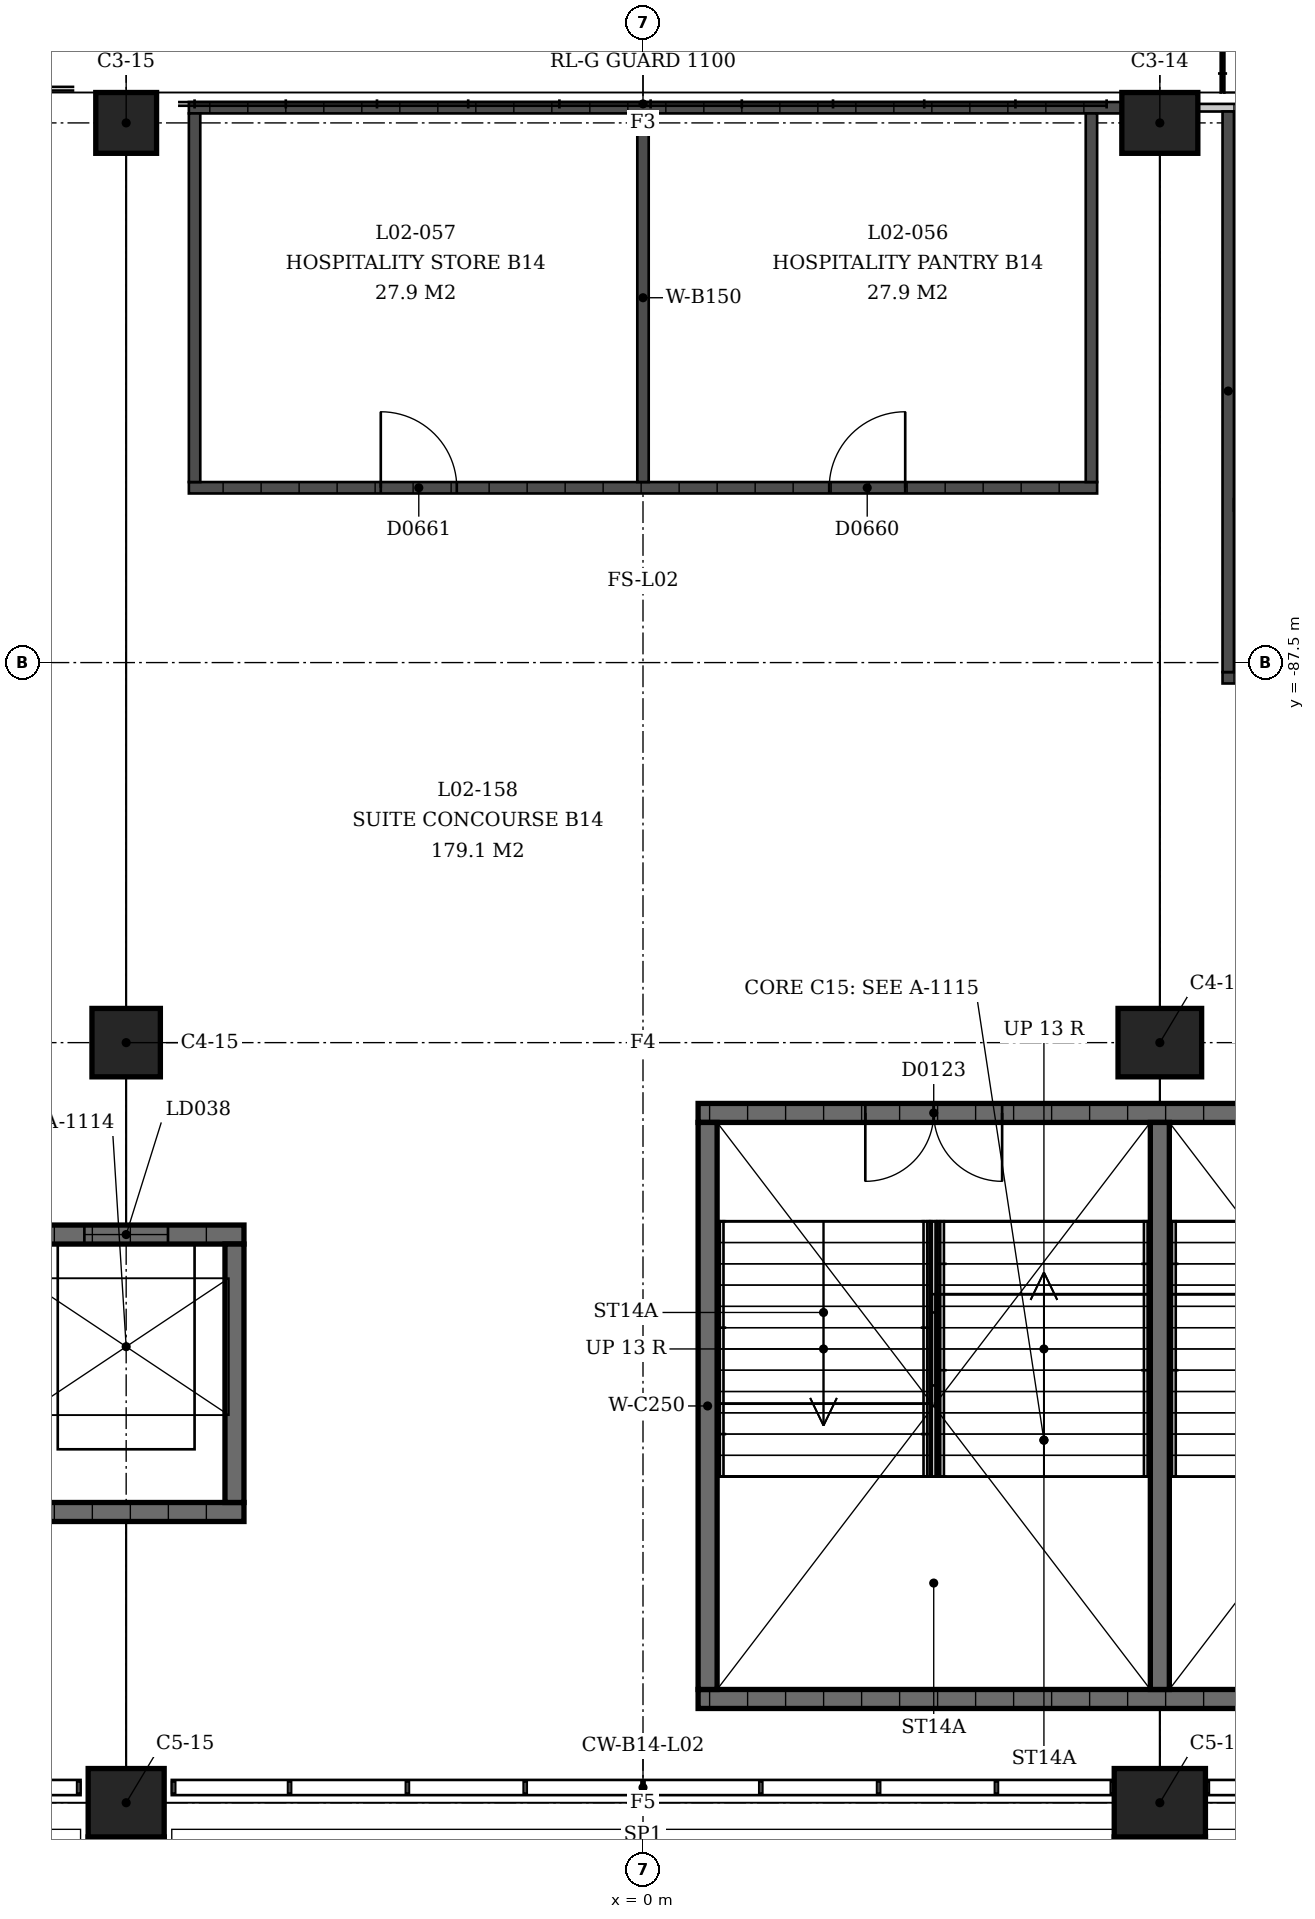
"""IFC4 building model, lengths in metres.
Left out: names, types, materials, properties, quantities, classifications, styles, units other than length and angle.
Written with IfcOpenShell. Run it as: python <this file> out.ifc"""

import sys

from ifc_helpers import new_model, si_unit, direction, frame, frame_2d, origin, origin_2d, place, context, subcontext, project, spatial, rectangle, extrude, element, fill, save


model = new_model("IFC4")
c1 = context("Model", 3, precision=1e-05, world=origin(), true_north=direction((0.0, 1.0)))
c2 = subcontext(c1, "Body", "Model", "MODEL_VIEW")
j1 = project(units=[si_unit("LENGTHUNIT", "METRE"), si_unit("PLANEANGLEUNIT", "RADIAN")], contexts=[c1])
p1 = place(None, origin())
s1 = spatial("IfcSite", under=j1, at=p1, CompositionType="ELEMENT")
p2 = place(p1, origin())
s2 = spatial("IfcBuilding", under=s1, at=p2, CompositionType="ELEMENT")
p3 = place(p2, frame((0.0, 0.0, 9.0)))
s3 = spatial("IfcBuildingStorey", under=s2, at=p3, CompositionType="ELEMENT", Elevation=9.0)
p4 = place(p3, frame((6.8, -80.4, 0.0), z_axis=(0.0, 0.0, 1.0), x_axis=(1.0, 0.0, 0.0)))
e1 = element("IfcColumn", 1, at=p4, inside=s3, PredefinedType="COLUMN", context=c2, shape_type="SweptSolid", body=[
    extrude(rectangle(XDim=1.0, YDim=0.8, at=origin_2d()), origin(), (0.0, 0.0, 1.0), 4.5),
])
p5 = place(p3, frame((6.8, -92.5, 0.0), z_axis=(0.0, 0.0, 1.0), x_axis=(1.0, 0.0, 0.0)))
e2 = element("IfcColumn", 2, at=p5, inside=s3, PredefinedType="COLUMN", context=c2, shape_type="SweptSolid", body=[
    extrude(rectangle(XDim=1.1, YDim=0.9, at=origin_2d()), origin(), (0.0, 0.0, 1.0), 4.5),
])
p6 = place(p3, frame((6.8, -102.5, 0.0), z_axis=(0.0, 0.0, 1.0), x_axis=(1.0, 0.0, 0.0)))
e3 = element("IfcColumn", 3, at=p6, inside=s3, PredefinedType="COLUMN", context=c2, shape_type="SweptSolid", body=[
    extrude(rectangle(XDim=1.2, YDim=0.9, at=origin_2d()), origin(), (0.0, 0.0, 1.0), 4.5),
])
p7 = place(p3, frame((-6.8, -80.4, 0.0), z_axis=(0.0, 0.0, 1.0), x_axis=(1.0, 0.0, 0.0)))
e4 = element("IfcColumn", 4, at=p7, inside=s3, PredefinedType="COLUMN", context=c2, shape_type="SweptSolid", body=[
    extrude(rectangle(XDim=0.8, YDim=0.8, at=origin_2d()), origin(), (0.0, 0.0, 1.0), 4.5),
])
p8 = place(p3, frame((-6.8, -92.5, 0.0), z_axis=(0.0, 0.0, 1.0), x_axis=(1.0, 0.0, 0.0)))
e5 = element("IfcColumn", 5, at=p8, inside=s3, PredefinedType="COLUMN", context=c2, shape_type="SweptSolid", body=[
    extrude(rectangle(XDim=0.9, YDim=0.9, at=origin_2d()), origin(), (0.0, 0.0, 1.0), 4.5),
])
p9 = place(p3, frame((-6.8, -102.5, 0.0), z_axis=(0.0, 0.0, 1.0), x_axis=(1.0, 0.0, 0.0)))
e6 = element("IfcColumn", 6, at=p9, inside=s3, PredefinedType="COLUMN", context=c2, shape_type="SweptSolid", body=[
    extrude(rectangle(XDim=1.0, YDim=0.9, at=origin_2d()), origin(), (0.0, 0.0, 1.0), 4.5),
])
p10 = place(p3, frame((0.725, -93.425, 0.0), z_axis=(0.0, 0.0, 1.0), x_axis=(1.0, 0.0, 0.0)))
e7 = element("IfcWall", 7, at=p10, inside=s3, PredefinedType="SHEAR", context=c2, shape_type="SweptSolid", body=[
    extrude(rectangle(XDim=12.15, YDim=0.25, at=frame_2d((6.075, 0.0))), origin(), (0.0, 0.0, 1.0), 4.09),
])
p11 = place(p10, frame((2.2, 0.0, 0.0)))
e8 = element("IfcOpeningElement", 8, at=p11, cuts=e7, PredefinedType="OPENING", context=c2, shape_type="SweptSolid", body=[
    extrude(rectangle(XDim=1.8, YDim=2.1, at=frame_2d((0.9, 1.05))), frame((0.0, 0.125, 0.0), z_axis=(0.0, -1.0, 0.0), x_axis=(1.0, 0.0, 0.0)), (0.0, 0.0, 1.0), 0.25),
])
p12 = place(p10, frame((8.15, 0.0, 0.0)))
e9 = element("IfcOpeningElement", 9, at=p12, cuts=e7, PredefinedType="OPENING", context=c2, shape_type="SweptSolid", body=[
    extrude(rectangle(XDim=1.8, YDim=2.1, at=frame_2d((0.9, 1.05))), frame((0.0, 0.125, 0.0), z_axis=(0.0, -1.0, 0.0), x_axis=(1.0, 0.0, 0.0)), (0.0, 0.0, 1.0), 0.25),
])
p13 = place(p3, frame((0.725, -101.135, 0.0), z_axis=(0.0, 0.0, 1.0), x_axis=(1.0, 0.0, 0.0)))
e10 = element("IfcWall", 10, at=p13, inside=s3, PredefinedType="SHEAR", context=c2, shape_type="SweptSolid", body=[
    extrude(rectangle(XDim=12.15, YDim=0.25, at=frame_2d((6.075, 0.0))), origin(), (0.0, 0.0, 1.0), 4.09),
])
for number, where, z_axis, x_axis in (
    (11, (0.85, -93.55, 0.0), (0.0, 0.0, 1.0), (0.0, -1.0, 0.0)),
    (12, (6.8, -93.55, 0.0), (0.0, 0.0, 1.0), (0.0, -1.0, 0.0)),
):
    element("IfcWall", number, at=place(p3, frame(where, z_axis=z_axis, x_axis=x_axis)), inside=s3, PredefinedType="SHEAR", context=c2, shape_type="SweptSolid", body=[
        extrude(rectangle(XDim=7.46, YDim=0.25, at=frame_2d((3.73, 0.0))), origin(), (0.0, 0.0, 1.0), 4.09),
    ])
p14 = place(p3, frame((-8.35, -95.025, 0.0), z_axis=(0.0, 0.0, 1.0), x_axis=(1.0, 0.0, 0.0)))
e13 = element("IfcWall", 13, at=p14, inside=s3, PredefinedType="SHEAR", context=c2, shape_type="SweptSolid", body=[
    extrude(rectangle(XDim=3.1, YDim=0.25, at=frame_2d((1.55, 0.0))), origin(), (0.0, 0.0, 1.0), 4.09),
])
p15 = place(p14, frame((1.0, 0.0, 0.0)))
e14 = element("IfcOpeningElement", 14, at=p15, cuts=e13, PredefinedType="OPENING", context=c2, shape_type="SweptSolid", body=[
    extrude(rectangle(XDim=1.1, YDim=2.1, at=frame_2d((0.55, 1.05))), frame((0.0, 0.125, 0.0), z_axis=(0.0, -1.0, 0.0), x_axis=(1.0, 0.0, 0.0)), (0.0, 0.0, 1.0), 0.25),
])
p16 = place(p3, frame((-8.35, -98.675, 0.0), z_axis=(0.0, 0.0, 1.0), x_axis=(1.0, 0.0, 0.0)))
e15 = element("IfcWall", 15, at=p16, inside=s3, PredefinedType="SHEAR", context=c2, shape_type="SweptSolid", body=[
    extrude(rectangle(XDim=3.1, YDim=0.25, at=frame_2d((1.55, 0.0))), origin(), (0.0, 0.0, 1.0), 4.09),
])
p17 = place(p3, frame((-5.375, -95.15, 0.0), z_axis=(0.0, 0.0, 1.0), x_axis=(0.0, -1.0, 0.0)))
e16 = element("IfcWall", 16, at=p17, inside=s3, PredefinedType="SHEAR", context=c2, shape_type="SweptSolid", body=[
    extrude(rectangle(XDim=3.4, YDim=0.25, at=frame_2d((1.7, 0.0))), origin(), (0.0, 0.0, 1.0), 4.09),
])
p18 = place(p3, frame((7.3, -80.2, 0.0), z_axis=(0.0, 0.0, 1.0), x_axis=(1.0, 0.0, 0.0)))
e17 = element("IfcWall", 17, at=p18, inside=s3, PredefinedType="PARTITIONING", context=c2, shape_type="SweptSolid", body=[
    extrude(rectangle(XDim=6.475, YDim=0.1, at=frame_2d((3.237, 0.0))), origin(), (0.0, 0.0, 1.0), 3.0),
])
p19 = place(p18, frame((2.5, 0.0, 0.0)))
e18 = element("IfcOpeningElement", 18, at=p19, cuts=e17, PredefinedType="OPENING", context=c2, shape_type="SweptSolid", body=[
    extrude(rectangle(XDim=1.8, YDim=2.1, at=frame_2d((0.9, 1.05))), frame((0.0, 0.05, 0.0), z_axis=(0.0, -1.0, 0.0), x_axis=(1.0, 0.0, 0.0)), (0.0, 0.0, 1.0), 0.1),
])
p20 = place(p3, frame((7.625, -87.7, 0.0), z_axis=(0.0, 0.0, 1.0), x_axis=(1.0, 0.0, 0.0)))
e19 = element("IfcWall", 19, at=p20, inside=s3, PredefinedType="SOLIDWALL", context=c2, shape_type="SweptSolid", body=[
    extrude(rectangle(XDim=6.15, YDim=0.15, at=frame_2d((3.075, 0.0))), origin(), (0.0, 0.0, 1.0), 3.0),
])
p21 = place(p20, frame((3.862, 0.0, 0.0)))
e20 = element("IfcOpeningElement", 20, at=p21, cuts=e19, PredefinedType="OPENING", context=c2, shape_type="SweptSolid", body=[
    extrude(rectangle(XDim=1.0, YDim=2.1, at=frame_2d((0.5, 1.05))), frame((0.0, 0.075, 0.0), z_axis=(0.0, -1.0, 0.0), x_axis=(1.0, 0.0, 0.0)), (0.0, 0.0, 1.0), 0.15),
])
p22 = place(p3, frame((7.7, -80.25, 0.0), z_axis=(0.0, 0.0, 1.0), x_axis=(0.0, -1.0, 0.0)))
e21 = element("IfcWall", 21, at=p22, inside=s3, PredefinedType="SOLIDWALL", context=c2, shape_type="SweptSolid", body=[
    extrude(rectangle(XDim=7.375, YDim=0.15, at=frame_2d((3.688, 0.0))), origin(), (0.0, 0.0, 1.0), 3.0),
])
p23 = place(p3, frame((7.775, -85.425, 0.0), z_axis=(0.0, 0.0, 1.0), x_axis=(1.0, 0.0, 0.0)))
e22 = element("IfcWall", 22, at=p23, inside=s3, PredefinedType="PARTITIONING", context=c2, shape_type="SweptSolid", body=[
    extrude(rectangle(XDim=1.775, YDim=0.15, at=frame_2d((0.888, 0.0))), origin(), (0.0, 0.0, 1.0), 3.0),
])
p24 = place(p23, frame((0.363, 0.0, 0.0)))
e23 = element("IfcOpeningElement", 23, at=p24, cuts=e22, PredefinedType="OPENING", context=c2, shape_type="SweptSolid", body=[
    extrude(rectangle(XDim=0.9, YDim=2.1, at=frame_2d((0.45, 1.05))), frame((0.0, 0.075, 0.0), z_axis=(0.0, -1.0, 0.0), x_axis=(1.0, 0.0, 0.0)), (0.0, 0.0, 1.0), 0.15),
])
p25 = place(p3, frame((6.3, -80.2, 0.0), z_axis=(0.0, 0.0, 1.0), x_axis=(-1.0, 0.0, 0.0)))
e24 = element("IfcWall", 24, at=p25, inside=s3, PredefinedType="SOLIDWALL", context=c2, shape_type="SweptSolid", body=[
    extrude(rectangle(XDim=12.275, YDim=0.15, at=frame_2d((6.138, 0.0))), origin(), (0.0, 0.0, 1.0), 3.0),
])
p26 = place(p3, frame((5.975, -85.2, 0.0), z_axis=(0.0, 0.0, 1.0), x_axis=(-1.0, 0.0, 0.0)))
e25 = element("IfcWall", 25, at=p26, inside=s3, PredefinedType="SOLIDWALL", context=c2, shape_type="SweptSolid", body=[
    extrude(rectangle(XDim=11.95, YDim=0.15, at=frame_2d((5.975, 0.0))), origin(), (0.0, 0.0, 1.0), 3.0),
])
p27 = place(p26, frame((2.525, 0.0, 0.0)))
e26 = element("IfcOpeningElement", 26, at=p27, cuts=e25, PredefinedType="OPENING", context=c2, shape_type="SweptSolid", body=[
    extrude(rectangle(XDim=1.0, YDim=2.1, at=frame_2d((0.5, 1.05))), frame((0.0, 0.075, 0.0), z_axis=(0.0, -1.0, 0.0), x_axis=(1.0, 0.0, 0.0)), (0.0, 0.0, 1.0), 0.15),
])
p28 = place(p26, frame((8.425, 0.0, 0.0)))
e27 = element("IfcOpeningElement", 27, at=p28, cuts=e25, PredefinedType="OPENING", context=c2, shape_type="SweptSolid", body=[
    extrude(rectangle(XDim=1.0, YDim=2.1, at=frame_2d((0.5, 1.05))), frame((0.0, 0.075, 0.0), z_axis=(0.0, -1.0, 0.0), x_axis=(1.0, 0.0, 0.0)), (0.0, 0.0, 1.0), 0.15),
])
for number, where, z_axis, x_axis in (
    (28, (5.9, -80.275, 0.0), (0.0, 0.0, 1.0), (0.0, -1.0, 0.0)),
    (29, (0.0, -80.275, 0.0), (0.0, 0.0, 1.0), (0.0, -1.0, 0.0)),
    (30, (-5.9, -80.275, 0.0), (0.0, 0.0, 1.0), (0.0, -1.0, 0.0)),
):
    element("IfcWall", number, at=place(p3, frame(where, z_axis=z_axis, x_axis=x_axis)), inside=s3, PredefinedType="SOLIDWALL", context=c2, shape_type="SweptSolid", body=[
        extrude(rectangle(XDim=4.85, YDim=0.15, at=frame_2d((2.425, 0.0))), origin(), (0.0, 0.0, 1.0), 3.0),
    ])
p29 = place(p11, origin())
e31 = element("IfcDoor", 31, at=p29, inside=s3, OperationType="DOUBLE_DOOR_SINGLE_SWING", PredefinedType="DOOR", context=c2, shape_type="SweptSolid", body=[
    extrude(rectangle(XDim=1.8, YDim=2.1, at=frame_2d((0.9, 1.05))), frame((0.0, 0.025, 0.0), z_axis=(0.0, -1.0, 0.0), x_axis=(1.0, 0.0, 0.0)), (0.0, 0.0, 1.0), 0.05),
])
fill(e8, e31)
p30 = place(p15, origin())
e32 = element("IfcDoor", 32, at=p30, inside=s3, OperationType="SLIDING_TO_LEFT", PredefinedType="DOOR", context=c2, shape_type="SweptSolid", body=[
    extrude(rectangle(XDim=1.1, YDim=2.1, at=frame_2d((0.55, 1.05))), frame((0.0, 0.025, 0.0), z_axis=(0.0, -1.0, 0.0), x_axis=(1.0, 0.0, 0.0)), (0.0, 0.0, 1.0), 0.05),
])
fill(e14, e32)
p31 = place(p27, origin())
e33 = element("IfcDoor", 33, at=p31, inside=s3, OperationType="SINGLE_SWING_LEFT", PredefinedType="DOOR", context=c2, shape_type="SweptSolid", body=[
    extrude(rectangle(XDim=1.0, YDim=2.1, at=frame_2d((0.5, 1.05))), frame((0.0, 0.025, 0.0), z_axis=(0.0, -1.0, 0.0), x_axis=(1.0, 0.0, 0.0)), (0.0, 0.0, 1.0), 0.05),
])
fill(e26, e33)
p32 = place(p28, origin())
e34 = element("IfcDoor", 34, at=p32, inside=s3, OperationType="SINGLE_SWING_RIGHT", PredefinedType="DOOR", context=c2, shape_type="SweptSolid", body=[
    extrude(rectangle(XDim=1.0, YDim=2.1, at=frame_2d((0.5, 1.05))), frame((0.0, 0.025, 0.0), z_axis=(0.0, -1.0, 0.0), x_axis=(1.0, 0.0, 0.0)), (0.0, 0.0, 1.0), 0.05),
])
fill(e27, e34)
save(model, sys.argv[1])
